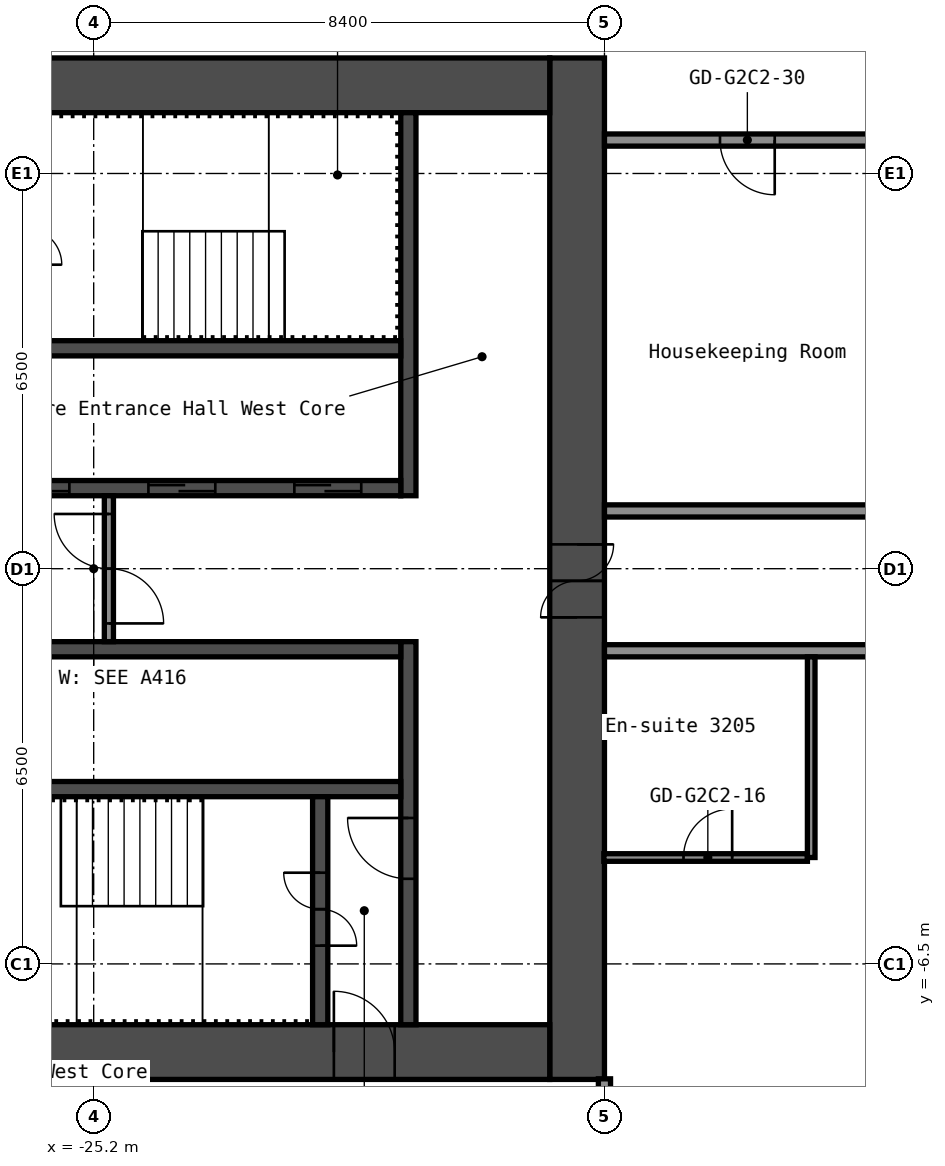
"""IFC4 building model, lengths in metres.
Left out: names, types, materials, properties, quantities, classifications, styles, units other than length and angle.
Written with IfcOpenShell. Run it as: python <this file> out.ifc"""

import sys

from ifc_helpers import new_model, si_unit, direction, frame, frame_2d, origin, place, context, subcontext, project, spatial, rectangle, extrude, element, fill, save


model = new_model("IFC4")
c1 = context("Model", 3, precision=1e-05, world=origin(), true_north=direction((0.0, 1.0)))
c2 = subcontext(c1, "Body", "Model", "MODEL_VIEW")
j1 = project(units=[si_unit("LENGTHUNIT", "METRE"), si_unit("PLANEANGLEUNIT", "RADIAN")], contexts=[c1])
p1 = place(None, origin())
s1 = spatial("IfcSite", under=j1, at=p1, CompositionType="ELEMENT")
p2 = place(p1, origin())
s2 = spatial("IfcBuilding", under=s1, at=p2, CompositionType="ELEMENT")
p3 = place(p2, frame((0.0, 0.0, 113.8)))
s3 = spatial("IfcBuildingStorey", under=s2, at=p3, CompositionType="ELEMENT", Elevation=113.8)
p4 = place(p3, frame((-17.25, -8.4, 0.0), z_axis=(0.0, 0.0, 1.0), x_axis=(0.0, 1.0, 0.0)))
e1 = element("IfcWall", 1, at=p4, inside=s3, PredefinedType="SHEAR", context=c2, shape_type="SweptSolid", body=[
    extrude(rectangle(XDim=16.8, YDim=0.9, at=frame_2d((8.4, 0.0))), origin(), (0.0, 0.0, 1.0), 2.8),
])
p5 = place(p4, frame((7.6, 0.0, 0.0)))
e2 = element("IfcOpeningElement", 2, at=p5, cuts=e1, PredefinedType="OPENING", context=c2, shape_type="SweptSolid", body=[
    extrude(rectangle(XDim=1.2, YDim=2.1, at=frame_2d((0.6, 1.05))), frame((0.0, 0.46, 0.0), z_axis=(0.0, -1.0, 0.0), x_axis=(1.0, 0.0, 0.0)), (0.0, 0.0, 1.0), 0.92),
])
p6 = place(p3, frame((-32.7, 7.95, 0.0), z_axis=(0.0, 0.0, 1.0), x_axis=(1.0, 0.0, 0.0)))
e3 = element("IfcWall", 3, at=p6, inside=s3, PredefinedType="SHEAR", context=c2, shape_type="SweptSolid", body=[
    extrude(rectangle(XDim=15.0, YDim=0.9, at=frame_2d((7.5, 0.0))), origin(), (0.0, 0.0, 1.0), 2.8),
])
p7 = place(p6, frame((3.4, 0.0, 0.0)))
e4 = element("IfcOpeningElement", 4, at=p7, cuts=e3, PredefinedType="OPENING", context=c2, shape_type="SweptSolid", body=[
    extrude(rectangle(XDim=1.2, YDim=2.1, at=frame_2d((0.6, 1.05))), frame((0.0, 0.46, 0.0), z_axis=(0.0, -1.0, 0.0), x_axis=(1.0, 0.0, 0.0)), (0.0, 0.0, 1.0), 0.92),
])
p8 = place(p6, frame((0.75, 0.0, 0.0)))
e5 = element("IfcOpeningElement", 5, at=p8, cuts=e3, PredefinedType="OPENING", context=c2, shape_type="SweptSolid", body=[
    extrude(rectangle(XDim=0.9, YDim=2.1, at=frame_2d((0.45, 1.05))), frame((0.0, 0.46, 0.0), z_axis=(0.0, -1.0, 0.0), x_axis=(1.0, 0.0, 0.0)), (0.0, 0.0, 1.0), 0.92),
])
p9 = place(p3, frame((-32.7, -7.95, 0.0), z_axis=(0.0, 0.0, 1.0), x_axis=(1.0, 0.0, 0.0)))
e6 = element("IfcWall", 6, at=p9, inside=s3, PredefinedType="SHEAR", context=c2, shape_type="SweptSolid", body=[
    extrude(rectangle(XDim=15.0, YDim=0.9, at=frame_2d((7.5, 0.0))), origin(), (0.0, 0.0, 1.0), 2.8),
])
p10 = place(p9, frame((11.45, 0.0, 0.0)))
e7 = element("IfcOpeningElement", 7, at=p10, cuts=e6, PredefinedType="OPENING", context=c2, shape_type="SweptSolid", body=[
    extrude(rectangle(XDim=1.0, YDim=2.1, at=frame_2d((0.5, 1.05))), frame((0.0, 0.46, 0.0), z_axis=(0.0, -1.0, 0.0), x_axis=(1.0, 0.0, 0.0)), (0.0, 0.0, 1.0), 0.92),
])
p11 = place(p3, frame((-20.025, 1.2, 0.0), z_axis=(0.0, 0.0, 1.0), x_axis=(0.0, 1.0, 0.0)))
e8 = element("IfcWall", 8, at=p11, inside=s3, PredefinedType="SHEAR", context=c2, shape_type="SweptSolid", body=[
    extrude(rectangle(XDim=6.3, YDim=0.25, at=frame_2d((3.15, 0.0))), origin(), (0.0, 0.0, 1.0), 2.8),
])
p12 = place(p3, frame((-20.025, -7.5, 0.0), z_axis=(0.0, 0.0, 1.0), x_axis=(0.0, 1.0, 0.0)))
e9 = element("IfcWall", 9, at=p12, inside=s3, PredefinedType="SHEAR", context=c2, shape_type="SweptSolid", body=[
    extrude(rectangle(XDim=6.3, YDim=0.25, at=frame_2d((3.15, 0.0))), origin(), (0.0, 0.0, 1.0), 2.8),
])
p13 = place(p12, frame((2.4, 0.0, 0.0)))
e10 = element("IfcOpeningElement", 10, at=p13, cuts=e9, PredefinedType="OPENING", context=c2, shape_type="SweptSolid", body=[
    extrude(rectangle(XDim=1.0, YDim=2.1, at=frame_2d((0.5, 1.05))), frame((0.0, 0.135, 0.0), z_axis=(0.0, -1.0, 0.0), x_axis=(1.0, 0.0, 0.0)), (0.0, 0.0, 1.0), 0.27),
])
p14 = place(p3, frame((-27.65, 1.325, 0.0), z_axis=(0.0, 0.0, 1.0), x_axis=(1.0, 0.0, 0.0)))
e11 = element("IfcWall", 11, at=p14, inside=s3, PredefinedType="SHEAR", context=c2, shape_type="SweptSolid", body=[
    extrude(rectangle(XDim=7.5, YDim=0.25, at=frame_2d((3.75, 0.0))), origin(), (0.0, 0.0, 1.0), 2.8),
])
p15 = place(p14, frame((5.75, 0.0, 0.0)))
e12 = element("IfcOpeningElement", 12, at=p15, cuts=e11, PredefinedType="OPENING", context=c2, shape_type="SweptSolid", body=[
    extrude(rectangle(XDim=1.1, YDim=2.1, at=frame_2d((0.55, 1.05))), frame((0.0, 0.135, 0.0), z_axis=(0.0, -1.0, 0.0), x_axis=(1.0, 0.0, 0.0)), (0.0, 0.0, 1.0), 0.27),
])
p16 = place(p14, frame((3.35, 0.0, 0.0)))
e13 = element("IfcOpeningElement", 13, at=p16, cuts=e11, PredefinedType="OPENING", context=c2, shape_type="SweptSolid", body=[
    extrude(rectangle(XDim=1.1, YDim=2.1, at=frame_2d((0.55, 1.05))), frame((0.0, 0.135, 0.0), z_axis=(0.0, -1.0, 0.0), x_axis=(1.0, 0.0, 0.0)), (0.0, 0.0, 1.0), 0.27),
])
p17 = place(p14, frame((0.95, 0.0, 0.0)))
e14 = element("IfcOpeningElement", 14, at=p17, cuts=e11, PredefinedType="OPENING", context=c2, shape_type="SweptSolid", body=[
    extrude(rectangle(XDim=1.1, YDim=2.1, at=frame_2d((0.55, 1.05))), frame((0.0, 0.135, 0.0), z_axis=(0.0, -1.0, 0.0), x_axis=(1.0, 0.0, 0.0)), (0.0, 0.0, 1.0), 0.27),
])
for number, where, z_axis, x_axis in (
    (15, (-27.65, 3.625, 0.0), (0.0, 0.0, 1.0), (1.0, 0.0, 0.0)),
    (16, (-27.65, -1.325, 0.0), (0.0, 0.0, 1.0), (1.0, 0.0, 0.0)),
    (17, (-27.65, -3.625, 0.0), (0.0, 0.0, 1.0), (1.0, 0.0, 0.0)),
):
    element("IfcWall", number, at=place(p3, frame(where, z_axis=z_axis, x_axis=x_axis)), inside=s3, PredefinedType="SHEAR", context=c2, shape_type="SweptSolid", body=[
        extrude(rectangle(XDim=7.5, YDim=0.25, at=frame_2d((3.75, 0.0))), origin(), (0.0, 0.0, 1.0), 2.8),
    ])
p18 = place(p3, frame((-21.475, -7.5, 0.0), z_axis=(0.0, 0.0, 1.0), x_axis=(0.0, 1.0, 0.0)))
e18 = element("IfcWall", 18, at=p18, inside=s3, PredefinedType="SHEAR", context=c2, shape_type="SweptSolid", body=[
    extrude(rectangle(XDim=3.75, YDim=0.25, at=frame_2d((1.875, 0.0))), origin(), (0.0, 0.0, 1.0), 2.8),
])
p19 = place(p18, frame((1.3, 0.0, 0.0)))
e19 = element("IfcOpeningElement", 19, at=p19, cuts=e18, PredefinedType="OPENING", context=c2, shape_type="SweptSolid", body=[
    extrude(rectangle(XDim=1.2, YDim=2.1, at=frame_2d((0.6, 1.05))), frame((0.0, 0.135, 0.0), z_axis=(0.0, -1.0, 0.0), x_axis=(1.0, 0.0, 0.0)), (0.0, 0.0, 1.0), 0.27),
])
p20 = place(p3, frame((-24.95, -1.2, 0.0), z_axis=(0.0, 0.0, 1.0), x_axis=(0.0, 1.0, 0.0)))
e20 = element("IfcWall", 20, at=p20, inside=s3, PredefinedType="PARTITIONING", context=c2, shape_type="SweptSolid", body=[
    extrude(rectangle(XDim=2.4, YDim=0.15, at=frame_2d((1.2, 0.0))), origin(), (0.0, 0.0, 1.0), 2.8),
])
p21 = place(p20, frame((0.3, 0.0, 0.0)))
e21 = element("IfcOpeningElement", 21, at=p21, cuts=e20, PredefinedType="OPENING", context=c2, shape_type="SweptSolid", body=[
    extrude(rectangle(XDim=1.8, YDim=2.1, at=frame_2d((0.9, 1.05))), frame((0.0, 0.085, 0.0), z_axis=(0.0, -1.0, 0.0), x_axis=(1.0, 0.0, 0.0)), (0.0, 0.0, 1.0), 0.17),
])
p22 = place(p3, frame((-16.81, -4.75, 0.0), z_axis=(0.0, 0.0, 1.0), x_axis=(1.0, 0.0, 0.0)))
e22 = element("IfcWall", 22, at=p22, inside=s3, PredefinedType="PARTITIONING", context=c2, shape_type="SweptSolid", body=[
    extrude(rectangle(XDim=3.348, YDim=0.125, at=frame_2d((1.674, 0.0))), origin(), (0.0, 0.0, 1.0), 2.8),
])
p23 = place(p22, frame((1.31, 0.0, 0.0)))
e23 = element("IfcOpeningElement", 23, at=p23, cuts=e22, PredefinedType="OPENING", context=c2, shape_type="SweptSolid", body=[
    extrude(rectangle(XDim=0.8, YDim=2.1, at=frame_2d((0.4, 1.05))), frame((0.0, 0.073, 0.0), z_axis=(0.0, -1.0, 0.0), x_axis=(1.0, 0.0, 0.0)), (0.0, 0.0, 1.0), 0.145),
])
p24 = place(p3, frame((-16.8, -1.35, 0.0), z_axis=(0.0, 0.0, 1.0), x_axis=(1.0, 0.0, 0.0)))
e24 = element("IfcWall", 24, at=p24, inside=s3, PredefinedType="PARTITIONING", context=c2, shape_type="SweptSolid", body=[
    extrude(rectangle(XDim=33.6, YDim=0.2, at=frame_2d((16.8, 0.0))), origin(), (0.0, 0.0, 1.0), 2.8),
])
p25 = place(p24, frame((5.4, 0.0, 0.0)))
e25 = element("IfcOpeningElement", 25, at=p25, cuts=e24, PredefinedType="OPENING", context=c2, shape_type="SweptSolid", body=[
    extrude(rectangle(XDim=1.0, YDim=2.1, at=frame_2d((0.5, 1.05))), frame((0.0, 0.11, 0.0), z_axis=(0.0, -1.0, 0.0), x_axis=(1.0, 0.0, 0.0)), (0.0, 0.0, 1.0), 0.22),
])
p26 = place(p24, frame((11.25, 0.0, 0.0)))
e26 = element("IfcOpeningElement", 26, at=p26, cuts=e24, PredefinedType="OPENING", context=c2, shape_type="SweptSolid", body=[
    extrude(rectangle(XDim=1.0, YDim=2.1, at=frame_2d((0.5, 1.05))), frame((0.0, 0.11, 0.0), z_axis=(0.0, -1.0, 0.0), x_axis=(1.0, 0.0, 0.0)), (0.0, 0.0, 1.0), 0.22),
])
p27 = place(p24, frame((12.95, 0.0, 0.0)))
e27 = element("IfcOpeningElement", 27, at=p27, cuts=e24, PredefinedType="OPENING", context=c2, shape_type="SweptSolid", body=[
    extrude(rectangle(XDim=1.0, YDim=2.1, at=frame_2d((0.5, 1.05))), frame((0.0, 0.11, 0.0), z_axis=(0.0, -1.0, 0.0), x_axis=(1.0, 0.0, 0.0)), (0.0, 0.0, 1.0), 0.22),
])
p28 = place(p24, frame((17.945, 0.0, 0.0)))
e28 = element("IfcOpeningElement", 28, at=p28, cuts=e24, PredefinedType="OPENING", context=c2, shape_type="SweptSolid", body=[
    extrude(rectangle(XDim=0.9, YDim=2.1, at=frame_2d((0.45, 1.05))), frame((0.0, 0.11, 0.0), z_axis=(0.0, -1.0, 0.0), x_axis=(1.0, 0.0, 0.0)), (0.0, 0.0, 1.0), 0.22),
])
p29 = place(p24, frame((22.145, 0.0, 0.0)))
e29 = element("IfcOpeningElement", 29, at=p29, cuts=e24, PredefinedType="OPENING", context=c2, shape_type="SweptSolid", body=[
    extrude(rectangle(XDim=0.9, YDim=2.1, at=frame_2d((0.45, 1.05))), frame((0.0, 0.11, 0.0), z_axis=(0.0, -1.0, 0.0), x_axis=(1.0, 0.0, 0.0)), (0.0, 0.0, 1.0), 0.22),
])
p30 = place(p24, frame((28.05, 0.0, 0.0)))
e30 = element("IfcOpeningElement", 30, at=p30, cuts=e24, PredefinedType="OPENING", context=c2, shape_type="SweptSolid", body=[
    extrude(rectangle(XDim=1.0, YDim=2.1, at=frame_2d((0.5, 1.05))), frame((0.0, 0.11, 0.0), z_axis=(0.0, -1.0, 0.0), x_axis=(1.0, 0.0, 0.0)), (0.0, 0.0, 1.0), 0.22),
])
p31 = place(p24, frame((29.75, 0.0, 0.0)))
e31 = element("IfcOpeningElement", 31, at=p31, cuts=e24, PredefinedType="OPENING", context=c2, shape_type="SweptSolid", body=[
    extrude(rectangle(XDim=1.0, YDim=2.1, at=frame_2d((0.5, 1.05))), frame((0.0, 0.11, 0.0), z_axis=(0.0, -1.0, 0.0), x_axis=(1.0, 0.0, 0.0)), (0.0, 0.0, 1.0), 0.22),
])
p32 = place(p3, frame((-16.8, 0.95, 0.0), z_axis=(0.0, 0.0, 1.0), x_axis=(1.0, 0.0, 0.0)))
e32 = element("IfcWall", 32, at=p32, inside=s3, PredefinedType="PARTITIONING", context=c2, shape_type="SweptSolid", body=[
    extrude(rectangle(XDim=33.6, YDim=0.2, at=frame_2d((16.8, 0.0))), origin(), (0.0, 0.0, 1.0), 2.8),
])
p33 = place(p32, frame((9.88, 0.0, 0.0)))
e33 = element("IfcOpeningElement", 33, at=p33, cuts=e32, PredefinedType="OPENING", context=c2, shape_type="SweptSolid", body=[
    extrude(rectangle(XDim=0.9, YDim=2.1, at=frame_2d((0.45, 1.05))), frame((0.0, 0.11, 0.0), z_axis=(0.0, -1.0, 0.0), x_axis=(1.0, 0.0, 0.0)), (0.0, 0.0, 1.0), 0.22),
])
p34 = place(p32, frame((14.08, 0.0, 0.0)))
e34 = element("IfcOpeningElement", 34, at=p34, cuts=e32, PredefinedType="OPENING", context=c2, shape_type="SweptSolid", body=[
    extrude(rectangle(XDim=0.9, YDim=2.1, at=frame_2d((0.45, 1.05))), frame((0.0, 0.11, 0.0), z_axis=(0.0, -1.0, 0.0), x_axis=(1.0, 0.0, 0.0)), (0.0, 0.0, 1.0), 0.22),
])
p35 = place(p32, frame((26.515, 0.0, 0.0)))
e35 = element("IfcOpeningElement", 35, at=p35, cuts=e32, PredefinedType="OPENING", context=c2, shape_type="SweptSolid", body=[
    extrude(rectangle(XDim=0.9, YDim=2.1, at=frame_2d((0.45, 1.05))), frame((0.0, 0.11, 0.0), z_axis=(0.0, -1.0, 0.0), x_axis=(1.0, 0.0, 0.0)), (0.0, 0.0, 1.0), 0.22),
])
p36 = place(p32, frame((30.715, 0.0, 0.0)))
e36 = element("IfcOpeningElement", 36, at=p36, cuts=e32, PredefinedType="OPENING", context=c2, shape_type="SweptSolid", body=[
    extrude(rectangle(XDim=0.9, YDim=2.1, at=frame_2d((0.45, 1.05))), frame((0.0, 0.11, 0.0), z_axis=(0.0, -1.0, 0.0), x_axis=(1.0, 0.0, 0.0)), (0.0, 0.0, 1.0), 0.22),
])
p37 = place(p3, frame((-16.8, 7.05, 0.0), z_axis=(0.0, 0.0, 1.0), x_axis=(1.0, 0.0, 0.0)))
e37 = element("IfcWall", 37, at=p37, inside=s3, PredefinedType="PARTITIONING", context=c2, shape_type="SweptSolid", body=[
    extrude(rectangle(XDim=33.6, YDim=0.2, at=frame_2d((16.8, 0.0))), origin(), (0.0, 0.0, 1.0), 2.8),
])
p38 = place(p37, frame((1.9, 0.0, 0.0)))
e38 = element("IfcOpeningElement", 38, at=p38, cuts=e37, PredefinedType="OPENING", context=c2, shape_type="SweptSolid", body=[
    extrude(rectangle(XDim=0.9, YDim=2.1, at=frame_2d((0.45, 1.05))), frame((0.0, 0.11, 0.0), z_axis=(0.0, -1.0, 0.0), x_axis=(1.0, 0.0, 0.0)), (0.0, 0.0, 1.0), 0.22),
])
p39 = place(p37, frame((6.1, 0.0, 0.0)))
e39 = element("IfcOpeningElement", 39, at=p39, cuts=e37, PredefinedType="OPENING", context=c2, shape_type="SweptSolid", body=[
    extrude(rectangle(XDim=0.9, YDim=2.1, at=frame_2d((0.45, 1.05))), frame((0.0, 0.11, 0.0), z_axis=(0.0, -1.0, 0.0), x_axis=(1.0, 0.0, 0.0)), (0.0, 0.0, 1.0), 0.22),
])
p40 = place(p37, frame((19.04, 0.0, 0.0)))
e40 = element("IfcOpeningElement", 40, at=p40, cuts=e37, PredefinedType="OPENING", context=c2, shape_type="SweptSolid", body=[
    extrude(rectangle(XDim=0.9, YDim=2.1, at=frame_2d((0.45, 1.05))), frame((0.0, 0.11, 0.0), z_axis=(0.0, -1.0, 0.0), x_axis=(1.0, 0.0, 0.0)), (0.0, 0.0, 1.0), 0.22),
])
p41 = place(p37, frame((23.24, 0.0, 0.0)))
e41 = element("IfcOpeningElement", 41, at=p41, cuts=e37, PredefinedType="OPENING", context=c2, shape_type="SweptSolid", body=[
    extrude(rectangle(XDim=0.9, YDim=2.1, at=frame_2d((0.45, 1.05))), frame((0.0, 0.11, 0.0), z_axis=(0.0, -1.0, 0.0), x_axis=(1.0, 0.0, 0.0)), (0.0, 0.0, 1.0), 0.22),
])
p42 = place(p3, frame((-16.8, -15.55, 0.0), z_axis=(0.0, 0.0, 1.0), x_axis=(0.0, 1.0, 0.0)))
e42 = element("IfcWall", 42, at=p42, inside=s3, PredefinedType="PARTITIONING", context=c2, shape_type="SweptSolid", body=[
    extrude(rectangle(XDim=7.16, YDim=0.2, at=frame_2d((3.58, 0.0))), origin(), (0.0, 0.0, 1.0), 2.8),
])
p43 = place(p3, frame((-13.4, -4.75, 0.0), z_axis=(0.0, 0.0, 1.0), x_axis=(0.0, 1.0, 0.0)))
e43 = element("IfcWall", 43, at=p43, inside=s3, PredefinedType="PARTITIONING", context=c2, shape_type="SweptSolid", body=[
    extrude(rectangle(XDim=3.3, YDim=0.125, at=frame_2d((1.65, 0.0))), origin(), (0.0, 0.0, 1.0), 2.8),
])
p44 = place(p5, origin())
e44 = element("IfcDoor", 44, at=p44, inside=s3, OperationType="DOUBLE_DOOR_SINGLE_SWING", PredefinedType="DOOR", context=c2, shape_type="SweptSolid", body=[
    extrude(rectangle(XDim=1.2, YDim=2.1, at=frame_2d((0.6, 1.05))), frame((0.0, 0.025, 0.0), z_axis=(0.0, -1.0, 0.0), x_axis=(1.0, 0.0, 0.0)), (0.0, 0.0, 1.0), 0.05),
])
fill(e2, e44)
p45 = place(p10, origin())
e45 = element("IfcDoor", 45, at=p45, inside=s3, OperationType="SINGLE_SWING_RIGHT", PredefinedType="DOOR", context=c2, shape_type="SweptSolid", body=[
    extrude(rectangle(XDim=1.0, YDim=2.1, at=frame_2d((0.5, 1.05))), frame((0.0, 0.025, 0.0), z_axis=(0.0, -1.0, 0.0), x_axis=(1.0, 0.0, 0.0)), (0.0, 0.0, 1.0), 0.05),
])
fill(e7, e45)
p46 = place(p19, origin())
e46 = element("IfcDoor", 46, at=p46, inside=s3, OperationType="DOUBLE_DOOR_SINGLE_SWING", PredefinedType="DOOR", context=c2, shape_type="SweptSolid", body=[
    extrude(rectangle(XDim=1.2, YDim=2.1, at=frame_2d((0.6, 1.05))), frame((0.0, 0.025, 0.0), z_axis=(0.0, -1.0, 0.0), x_axis=(1.0, 0.0, 0.0)), (0.0, 0.0, 1.0), 0.05),
])
fill(e19, e46)
p47 = place(p13, origin())
e47 = element("IfcDoor", 47, at=p47, inside=s3, OperationType="SINGLE_SWING_LEFT", PredefinedType="DOOR", context=c2, shape_type="SweptSolid", body=[
    extrude(rectangle(XDim=1.0, YDim=2.1, at=frame_2d((0.5, 1.05))), frame((0.0, 0.025, 0.0), z_axis=(0.0, -1.0, 0.0), x_axis=(1.0, 0.0, 0.0)), (0.0, 0.0, 1.0), 0.05),
])
fill(e10, e47)
p48 = place(p21, origin())
e48 = element("IfcDoor", 48, at=p48, inside=s3, OperationType="DOUBLE_DOOR_SINGLE_SWING", PredefinedType="DOOR", context=c2, shape_type="SweptSolid", body=[
    extrude(rectangle(XDim=1.8, YDim=2.1, at=frame_2d((0.9, 1.05))), frame((0.0, 0.025, 0.0), z_axis=(0.0, -1.0, 0.0), x_axis=(1.0, 0.0, 0.0)), (0.0, 0.0, 1.0), 0.05),
])
fill(e21, e48)
p49 = place(p15, origin())
e49 = element("IfcDoor", 49, at=p49, inside=s3, OperationType="DOUBLE_DOOR_SLIDING", PredefinedType="DOOR", context=c2, shape_type="SweptSolid", body=[
    extrude(rectangle(XDim=1.1, YDim=2.1, at=frame_2d((0.55, 1.05))), frame((0.0, 0.025, 0.0), z_axis=(0.0, -1.0, 0.0), x_axis=(1.0, 0.0, 0.0)), (0.0, 0.0, 1.0), 0.05),
])
fill(e12, e49)
p50 = place(p16, origin())
e50 = element("IfcDoor", 50, at=p50, inside=s3, OperationType="DOUBLE_DOOR_SLIDING", PredefinedType="DOOR", context=c2, shape_type="SweptSolid", body=[
    extrude(rectangle(XDim=1.1, YDim=2.1, at=frame_2d((0.55, 1.05))), frame((0.0, 0.025, 0.0), z_axis=(0.0, -1.0, 0.0), x_axis=(1.0, 0.0, 0.0)), (0.0, 0.0, 1.0), 0.05),
])
fill(e13, e50)
p51 = place(p17, origin())
e51 = element("IfcDoor", 51, at=p51, inside=s3, OperationType="DOUBLE_DOOR_SLIDING", PredefinedType="DOOR", context=c2, shape_type="SweptSolid", body=[
    extrude(rectangle(XDim=1.1, YDim=2.1, at=frame_2d((0.55, 1.05))), frame((0.0, 0.025, 0.0), z_axis=(0.0, -1.0, 0.0), x_axis=(1.0, 0.0, 0.0)), (0.0, 0.0, 1.0), 0.05),
])
fill(e14, e51)
p52 = place(p23, origin())
e52 = element("IfcDoor", 52, at=p52, inside=s3, OperationType="SINGLE_SWING_LEFT", PredefinedType="DOOR", context=c2, shape_type="SweptSolid", body=[
    extrude(rectangle(XDim=0.8, YDim=2.1, at=frame_2d((0.4, 1.05))), frame((0.0, 0.025, 0.0), z_axis=(0.0, -1.0, 0.0), x_axis=(1.0, 0.0, 0.0)), (0.0, 0.0, 1.0), 0.05),
])
fill(e23, e52)
p53 = place(p38, origin())
e53 = element("IfcDoor", 53, at=p53, inside=s3, OperationType="SINGLE_SWING_RIGHT", PredefinedType="DOOR", context=c2, shape_type="SweptSolid", body=[
    extrude(rectangle(XDim=0.9, YDim=2.1, at=frame_2d((0.45, 1.05))), frame((0.0, 0.025, 0.0), z_axis=(0.0, -1.0, 0.0), x_axis=(1.0, 0.0, 0.0)), (0.0, 0.0, 1.0), 0.05),
])
fill(e38, e53)
save(model, sys.argv[1])
